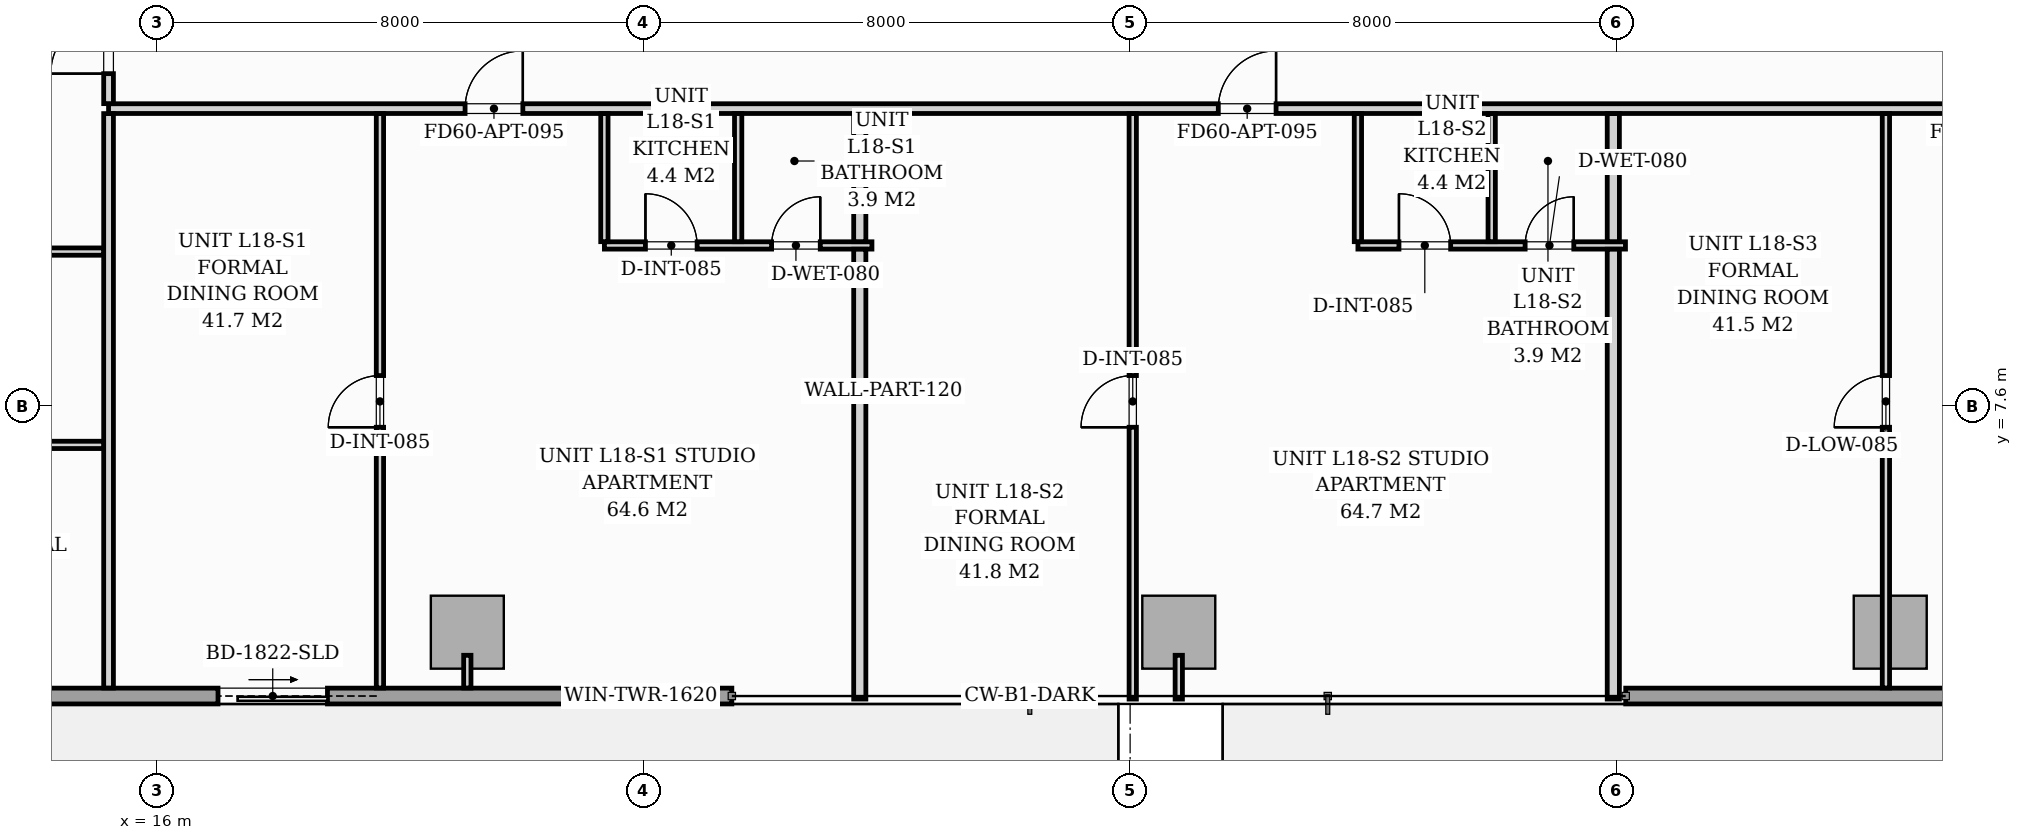
"""IFC4 building model, lengths in metres.
Left out: names, types, materials, properties, quantities, classifications, styles, units other than length and angle.
Written with IfcOpenShell. Run it as: python <this file> out.ifc"""

import sys

from ifc_helpers import new_model, si_unit, direction, frame, frame_2d, origin, origin_2d, place, context, subcontext, project, spatial, rectangle, extrude, source, transform, mapped, element, fill, save


model = new_model("IFC4")
c1 = context("Model", 3, precision=1e-05, world=origin(), true_north=direction((0.0, 1.0)))
c2 = subcontext(c1, "Body", "Model", "MODEL_VIEW")
j1 = project(units=[si_unit("LENGTHUNIT", "METRE"), si_unit("PLANEANGLEUNIT", "RADIAN")], contexts=[c1])
p1 = place(None, origin())
s1 = spatial("IfcSite", under=j1, at=p1, CompositionType="ELEMENT")
p2 = place(p1, origin())
s2 = spatial("IfcBuilding", under=s1, at=p2, CompositionType="ELEMENT")
p3 = place(p2, frame((0.0, 0.0, 64.6)))
s3 = spatial("IfcBuildingStorey", under=s2, at=p3, CompositionType="ELEMENT", Elevation=64.6)
m1 = source(origin(), c2, "Body", "SweptSolid", [
    extrude(rectangle(XDim=1.2, YDim=1.2, at=origin_2d()), origin(), (0.0, 0.0, 1.0), 3.194),
])
for number, where, z_axis, x_axis in (
    (1, (21.1, 3.88, 0.002), (0.0, 0.0, 1.0), (1.0, 0.0, 0.0)),
    (2, (32.8, 3.88, 0.002), (0.0, 0.0, 1.0), (1.0, 0.0, 0.0)),
    (3, (44.5, 3.88, 0.002), (0.0, 0.0, 1.0), (1.0, 0.0, 0.0)),
):
    element("IfcColumn", number, at=place(p3, frame(where, z_axis=z_axis, x_axis=x_axis)), inside=s3, PredefinedType="COLUMN", context=c2, shape_type="MappedRepresentation", body=[
        mapped(m1, transform((0.0, 0.0, 0.0), scale=1.0)),
    ])
p4 = place(p3, frame((57.3, 2.83, 0.0), z_axis=(0.0, 0.0, 1.0), x_axis=(-1.0, 0.0, 0.0)))
e4 = element("IfcWall", 4, at=p4, inside=s3, PredefinedType="STANDARD", context=c2, shape_type="SweptSolid", body=[
    extrude(rectangle(XDim=17.15, YDim=0.26, at=frame_2d((8.575, 0.0))), origin(), (0.0, 0.0, 1.0), 2.9),
])
p5 = place(p4, frame((8.636, 0.0, 0.0)))
e5 = element("IfcOpeningElement", 5, at=p5, cuts=e4, PredefinedType="OPENING", context=c2, shape_type="SweptSolid", body=[
    extrude(rectangle(XDim=1.8, YDim=2.06, at=frame_2d((0.9, 1.03))), frame((0.0, 0.14, 0.0), z_axis=(0.0, -1.0, 0.0), x_axis=(1.0, 0.0, 0.0)), (0.0, 0.0, 1.0), 0.28),
])
p6 = place(p4, frame((2.05, 0.0, 0.65)))
e6 = element("IfcOpeningElement", 6, at=p6, cuts=e4, PredefinedType="OPENING", context=c2, shape_type="SweptSolid", body=[
    extrude(rectangle(XDim=1.6, YDim=1.5, at=frame_2d((0.8, 0.75))), frame((0.0, 0.14, 0.0), z_axis=(0.0, -1.0, 0.0), x_axis=(1.0, 0.0, 0.0)), (0.0, 0.0, 1.0), 0.28),
])
p7 = place(p3, frame((25.45, 2.83, 0.0), z_axis=(0.0, 0.0, 1.0), x_axis=(-1.0, 0.0, 0.0)))
e7 = element("IfcWall", 7, at=p7, inside=s3, PredefinedType="STANDARD", context=c2, shape_type="SweptSolid", body=[
    extrude(rectangle(XDim=17.15, YDim=0.26, at=frame_2d((8.575, 0.0))), origin(), (0.0, 0.0, 1.0), 2.9),
])
p8 = place(p7, frame((6.65, 0.0, 0.0)))
e8 = element("IfcOpeningElement", 8, at=p8, cuts=e7, PredefinedType="OPENING", context=c2, shape_type="SweptSolid", body=[
    extrude(rectangle(XDim=1.8, YDim=2.06, at=frame_2d((0.9, 1.03))), frame((0.0, 0.14, 0.0), z_axis=(0.0, -1.0, 0.0), x_axis=(1.0, 0.0, 0.0)), (0.0, 0.0, 1.0), 0.28),
])
p9 = place(p7, frame((0.7, 0.0, 0.65)))
e9 = element("IfcOpeningElement", 9, at=p9, cuts=e7, PredefinedType="OPENING", context=c2, shape_type="SweptSolid", body=[
    extrude(rectangle(XDim=1.6, YDim=1.5, at=frame_2d((0.8, 0.75))), frame((0.0, 0.14, 0.0), z_axis=(0.0, -1.0, 0.0), x_axis=(1.0, 0.0, 0.0)), (0.0, 0.0, 1.0), 0.28),
])
p10 = place(p3, frame((15.2, 12.49, 0.0), z_axis=(0.0, 0.0, 1.0), x_axis=(1.0, 0.0, 0.0)))
e10 = element("IfcWall", 10, at=p10, inside=s3, PredefinedType="PARTITIONING", context=c2, shape_type="SweptSolid", body=[
    extrude(rectangle(XDim=37.1, YDim=0.16, at=frame_2d((18.55, 0.0))), origin(), (0.0, 0.0, 1.0), 2.9),
])
p11 = place(p10, frame((5.863, 0.0, 0.0)))
e11 = element("IfcOpeningElement", 11, at=p11, cuts=e10, PredefinedType="OPENING", context=c2, shape_type="SweptSolid", body=[
    extrude(rectangle(XDim=0.95, YDim=2.06, at=frame_2d((0.475, 1.03))), frame((0.0, 0.09, 0.0), z_axis=(0.0, -1.0, 0.0), x_axis=(1.0, 0.0, 0.0)), (0.0, 0.0, 1.0), 0.18),
])
p12 = place(p10, frame((18.25, 0.0, 0.0)))
e12 = element("IfcOpeningElement", 12, at=p12, cuts=e10, PredefinedType="OPENING", context=c2, shape_type="SweptSolid", body=[
    extrude(rectangle(XDim=0.95, YDim=2.06, at=frame_2d((0.475, 1.03))), frame((0.0, 0.09, 0.0), z_axis=(0.0, -1.0, 0.0), x_axis=(1.0, 0.0, 0.0)), (0.0, 0.0, 1.0), 0.18),
])
p13 = place(p10, frame((30.63, 0.0, 0.0)))
e13 = element("IfcOpeningElement", 13, at=p13, cuts=e10, PredefinedType="OPENING", context=c2, shape_type="SweptSolid", body=[
    extrude(rectangle(XDim=0.95, YDim=2.06, at=frame_2d((0.475, 1.03))), frame((0.0, 0.09, 0.0), z_axis=(0.0, -1.0, 0.0), x_axis=(1.0, 0.0, 0.0)), (0.0, 0.0, 1.0), 0.18),
])
p14 = place(p3, frame((15.2, 2.962, 0.0), z_axis=(0.0, 0.0, 1.0), x_axis=(0.0, 1.0, 0.0)))
e14 = element("IfcWall", 14, at=p14, inside=s3, PredefinedType="PARTITIONING", context=c2, shape_type="SweptSolid", body=[
    extrude(rectangle(XDim=9.446, YDim=0.16, at=frame_2d((4.723, 0.0))), origin(), (0.0, 0.0, 1.0), 2.9),
])
p15 = place(p3, frame((15.2, 12.572, 0.0), z_axis=(0.0, 0.0, 1.0), x_axis=(0.0, 1.0, 0.0)))
e15 = element("IfcWall", 15, at=p15, inside=s3, PredefinedType="PARTITIONING", context=c2, shape_type="SweptSolid", body=[
    extrude(rectangle(XDim=14.866, YDim=0.16, at=frame_2d((7.433, 0.0))), origin(), (0.0, 0.0, 1.0), 2.9),
])
p16 = place(p15, frame((0.493, 0.0, 0.0)))
e16 = element("IfcOpeningElement", 16, at=p16, cuts=e15, PredefinedType="OPENING", context=c2, shape_type="SweptSolid", body=[
    extrude(rectangle(XDim=0.95, YDim=2.06, at=frame_2d((0.475, 1.03))), frame((0.0, 0.09, 0.0), z_axis=(0.0, -1.0, 0.0), x_axis=(1.0, 0.0, 0.0)), (0.0, 0.0, 1.0), 0.18),
])
p17 = place(p15, frame((6.413, 0.0, 0.0)))
e17 = element("IfcOpeningElement", 17, at=p17, cuts=e15, PredefinedType="OPENING", context=c2, shape_type="SweptSolid", body=[
    extrude(rectangle(XDim=0.95, YDim=2.06, at=frame_2d((0.475, 1.03))), frame((0.0, 0.09, 0.0), z_axis=(0.0, -1.0, 0.0), x_axis=(1.0, 0.0, 0.0)), (0.0, 0.0, 1.0), 0.18),
])
p18 = place(p3, frame((23.354, 10.24, 0.0), z_axis=(0.0, 0.0, 1.0), x_axis=(1.0, 0.0, 0.0)))
e18 = element("IfcWall", 18, at=p18, inside=s3, PredefinedType="PARTITIONING", context=c2, shape_type="SweptSolid", body=[
    extrude(rectangle(XDim=4.4, YDim=0.12, at=frame_2d((2.2, 0.0))), origin(), (0.0, 0.0, 1.0), 2.9),
])
p19 = place(p18, frame((0.675, 0.0, 0.0)))
e19 = element("IfcOpeningElement", 19, at=p19, cuts=e18, PredefinedType="OPENING", context=c2, shape_type="SweptSolid", body=[
    extrude(rectangle(XDim=0.85, YDim=2.05, at=frame_2d((0.425, 1.025))), frame((0.0, 0.07, 0.0), z_axis=(0.0, -1.0, 0.0), x_axis=(1.0, 0.0, 0.0)), (0.0, 0.0, 1.0), 0.14),
])
p20 = place(p18, frame((2.75, 0.0, 0.0)))
e20 = element("IfcOpeningElement", 20, at=p20, cuts=e18, PredefinedType="OPENING", context=c2, shape_type="SweptSolid", body=[
    extrude(rectangle(XDim=0.8, YDim=2.02, at=frame_2d((0.4, 1.01))), frame((0.0, 0.07, 0.0), z_axis=(0.0, -1.0, 0.0), x_axis=(1.0, 0.0, 0.0)), (0.0, 0.0, 1.0), 0.14),
])
for number, where, z_axis, x_axis in (
    (21, (23.354, 10.302, 0.0), (0.0, 0.0, 1.0), (0.0, 1.0, 0.0)),
    (22, (25.554, 10.302, 0.0), (0.0, 0.0, 1.0), (0.0, 1.0, 0.0)),
):
    element("IfcWall", number, at=place(p3, frame(where, z_axis=z_axis, x_axis=x_axis)), inside=s3, PredefinedType="PARTITIONING", context=c2, shape_type="SweptSolid", body=[
        extrude(rectangle(XDim=2.106, YDim=0.12, at=frame_2d((1.053, 0.0))), origin(), (0.0, 0.0, 1.0), 2.9),
    ])
p21 = place(p3, frame((19.663, 2.962, 0.0), z_axis=(0.0, 0.0, 1.0), x_axis=(0.0, 1.0, 0.0)))
e23 = element("IfcWall", 23, at=p21, inside=s3, PredefinedType="PARTITIONING", context=c2, shape_type="SweptSolid", body=[
    extrude(rectangle(XDim=9.446, YDim=0.12, at=frame_2d((4.723, 0.0))), origin(), (0.0, 0.0, 1.0), 2.9),
])
p22 = place(p21, frame((4.288, 0.0, 0.0)))
e24 = element("IfcOpeningElement", 24, at=p22, cuts=e23, PredefinedType="OPENING", context=c2, shape_type="SweptSolid", body=[
    extrude(rectangle(XDim=0.85, YDim=2.05, at=frame_2d((0.425, 1.025))), frame((0.0, 0.07, 0.0), z_axis=(0.0, -1.0, 0.0), x_axis=(1.0, 0.0, 0.0)), (0.0, 0.0, 1.0), 0.14),
])
p23 = place(p3, frame((27.554, 2.78, 0.0), z_axis=(0.0, 0.0, 1.0), x_axis=(0.0, 1.0, 0.0)))
e25 = element("IfcWall", 25, at=p23, inside=s3, PredefinedType="PARTITIONING", context=c2, shape_type="SweptSolid", body=[
    extrude(rectangle(XDim=7.398, YDim=0.2, at=frame_2d((3.699, 0.0))), origin(), (0.0, 0.0, 1.0), 2.9),
])
p24 = place(p3, frame((27.554, 10.302, 0.0), z_axis=(0.0, 0.0, 1.0), x_axis=(0.0, 1.0, 0.0)))
e26 = element("IfcWall", 26, at=p24, inside=s3, PredefinedType="PARTITIONING", context=c2, shape_type="SweptSolid", body=[
    extrude(rectangle(XDim=2.106, YDim=0.2, at=frame_2d((1.053, 0.0))), origin(), (0.0, 0.0, 1.0), 2.9),
])
p25 = place(p3, frame((35.746, 10.24, 0.0), z_axis=(0.0, 0.0, 1.0), x_axis=(1.0, 0.0, 0.0)))
e27 = element("IfcWall", 27, at=p25, inside=s3, PredefinedType="PARTITIONING", context=c2, shape_type="SweptSolid", body=[
    extrude(rectangle(XDim=4.4, YDim=0.12, at=frame_2d((2.2, 0.0))), origin(), (0.0, 0.0, 1.0), 2.9),
])
p26 = place(p25, frame((0.675, 0.0, 0.0)))
e28 = element("IfcOpeningElement", 28, at=p26, cuts=e27, PredefinedType="OPENING", context=c2, shape_type="SweptSolid", body=[
    extrude(rectangle(XDim=0.85, YDim=2.05, at=frame_2d((0.425, 1.025))), frame((0.0, 0.07, 0.0), z_axis=(0.0, -1.0, 0.0), x_axis=(1.0, 0.0, 0.0)), (0.0, 0.0, 1.0), 0.14),
])
p27 = place(p25, frame((2.75, 0.0, 0.0)))
e29 = element("IfcOpeningElement", 29, at=p27, cuts=e27, PredefinedType="OPENING", context=c2, shape_type="SweptSolid", body=[
    extrude(rectangle(XDim=0.8, YDim=2.02, at=frame_2d((0.4, 1.01))), frame((0.0, 0.07, 0.0), z_axis=(0.0, -1.0, 0.0), x_axis=(1.0, 0.0, 0.0)), (0.0, 0.0, 1.0), 0.14),
])
for number, where, z_axis, x_axis in (
    (30, (35.746, 10.302, 0.0), (0.0, 0.0, 1.0), (0.0, 1.0, 0.0)),
    (31, (37.946, 10.302, 0.0), (0.0, 0.0, 1.0), (0.0, 1.0, 0.0)),
):
    element("IfcWall", number, at=place(p3, frame(where, z_axis=z_axis, x_axis=x_axis)), inside=s3, PredefinedType="PARTITIONING", context=c2, shape_type="SweptSolid", body=[
        extrude(rectangle(XDim=2.106, YDim=0.12, at=frame_2d((1.053, 0.0))), origin(), (0.0, 0.0, 1.0), 2.9),
    ])
p28 = place(p3, frame((32.043, 2.78, 0.0), z_axis=(0.0, 0.0, 1.0), x_axis=(0.0, 1.0, 0.0)))
e32 = element("IfcWall", 32, at=p28, inside=s3, PredefinedType="PARTITIONING", context=c2, shape_type="SweptSolid", body=[
    extrude(rectangle(XDim=9.628, YDim=0.12, at=frame_2d((4.814, 0.0))), origin(), (0.0, 0.0, 1.0), 2.9),
])
p29 = place(p28, frame((4.47, 0.0, 0.0)))
e33 = element("IfcOpeningElement", 33, at=p29, cuts=e32, PredefinedType="OPENING", context=c2, shape_type="SweptSolid", body=[
    extrude(rectangle(XDim=0.85, YDim=2.05, at=frame_2d((0.425, 1.025))), frame((0.0, 0.07, 0.0), z_axis=(0.0, -1.0, 0.0), x_axis=(1.0, 0.0, 0.0)), (0.0, 0.0, 1.0), 0.14),
])
p30 = place(p3, frame((39.946, 2.78, 0.0), z_axis=(0.0, 0.0, 1.0), x_axis=(0.0, 1.0, 0.0)))
e34 = element("IfcWall", 34, at=p30, inside=s3, PredefinedType="PARTITIONING", context=c2, shape_type="SweptSolid", body=[
    extrude(rectangle(XDim=7.398, YDim=0.2, at=frame_2d((3.699, 0.0))), origin(), (0.0, 0.0, 1.0), 2.9),
])
p31 = place(p3, frame((39.946, 10.302, 0.0), z_axis=(0.0, 0.0, 1.0), x_axis=(0.0, 1.0, 0.0)))
e35 = element("IfcWall", 35, at=p31, inside=s3, PredefinedType="PARTITIONING", context=c2, shape_type="SweptSolid", body=[
    extrude(rectangle(XDim=2.106, YDim=0.2, at=frame_2d((1.053, 0.0))), origin(), (0.0, 0.0, 1.0), 2.9),
])
p32 = place(p3, frame((44.429, 2.962, 0.0), z_axis=(0.0, 0.0, 1.0), x_axis=(0.0, 1.0, 0.0)))
e36 = element("IfcWall", 36, at=p32, inside=s3, PredefinedType="PARTITIONING", context=c2, shape_type="SweptSolid", body=[
    extrude(rectangle(XDim=9.446, YDim=0.12, at=frame_2d((4.723, 0.0))), origin(), (0.0, 0.0, 1.0), 2.096),
])
p33 = place(p32, frame((4.288, 0.0, 0.0)))
e37 = element("IfcOpeningElement", 37, at=p33, cuts=e36, PredefinedType="OPENING", context=c2, shape_type="SweptSolid", body=[
    extrude(rectangle(XDim=0.85, YDim=2.01, at=frame_2d((0.425, 1.005))), frame((0.0, 0.07, 0.0), z_axis=(0.0, -1.0, 0.0), x_axis=(1.0, 0.0, 0.0)), (0.0, 0.0, 1.0), 0.14),
])
p34 = place(p3, frame((5.88, 6.96, 0.0), z_axis=(0.0, 0.0, 1.0), x_axis=(1.0, 0.0, 0.0)))
e38 = element("IfcWall", 38, at=p34, inside=s3, PredefinedType="PARTITIONING", context=c2, shape_type="SweptSolid", body=[
    extrude(rectangle(XDim=9.238, YDim=0.12, at=frame_2d((4.619, 0.0))), origin(), (0.0, 0.0, 1.0), 2.9),
])
p35 = place(p34, frame((4.185, 0.0, 0.0)))
e39 = element("IfcOpeningElement", 39, at=p35, cuts=e38, PredefinedType="OPENING", context=c2, shape_type="SweptSolid", body=[
    extrude(rectangle(XDim=0.8, YDim=2.0, at=frame_2d((0.4, 1.0))), frame((0.0, 0.07, 0.0), z_axis=(0.0, -1.0, 0.0), x_axis=(1.0, 0.0, 0.0)), (0.0, 0.0, 1.0), 0.14),
])
p36 = place(p3, frame((5.88, 10.139, 0.0), z_axis=(0.0, 0.0, 1.0), x_axis=(1.0, 0.0, 0.0)))
e40 = element("IfcWall", 40, at=p36, inside=s3, PredefinedType="PARTITIONING", context=c2, shape_type="SweptSolid", body=[
    extrude(rectangle(XDim=9.238, YDim=0.12, at=frame_2d((4.619, 0.0))), origin(), (0.0, 0.0, 1.0), 2.9),
])
p37 = place(p36, frame((4.185, 0.0, 0.0)))
e41 = element("IfcOpeningElement", 41, at=p37, cuts=e40, PredefinedType="OPENING", context=c2, shape_type="SweptSolid", body=[
    extrude(rectangle(XDim=0.85, YDim=2.05, at=frame_2d((0.425, 1.025))), frame((0.0, 0.07, 0.0), z_axis=(0.0, -1.0, 0.0), x_axis=(1.0, 0.0, 0.0)), (0.0, 0.0, 1.0), 0.14),
])
p38 = place(p3, frame((21.1, 3.5, 0.0), z_axis=(0.0, 0.0, 1.0), x_axis=(0.0, -1.0, 0.0)))
e42 = element("IfcWall", 42, at=p38, inside=s3, PredefinedType="PARTITIONING", context=c2, shape_type="SweptSolid", body=[
    extrude(rectangle(XDim=0.538, YDim=0.12, at=frame_2d((0.269, 0.0))), origin(), (0.0, 0.0, 1.0), 2.9),
])
p39 = place(p3, frame((32.8, 3.5, 0.0), z_axis=(0.0, 0.0, 1.0), x_axis=(0.0, -1.0, 0.0)))
e43 = element("IfcWall", 43, at=p39, inside=s3, PredefinedType="PARTITIONING", context=c2, shape_type="SweptSolid", body=[
    extrude(rectangle(XDim=0.72, YDim=0.12, at=frame_2d((0.36, 0.0))), origin(), (0.0, 0.0, 1.0), 2.9),
])
m2 = source(origin(), c2, "Body", "SweptSolid", [
    extrude(rectangle(XDim=1.8, YDim=2.06, at=frame_2d((0.9, 1.03))), frame((0.0, 0.025, 0.0), z_axis=(0.0, -1.0, 0.0), x_axis=(1.0, 0.0, 0.0)), (0.0, 0.0, 1.0), 0.05),
])
p40 = place(p8, origin())
e44 = element("IfcDoor", 44, at=p40, inside=s3, OperationType="SLIDING_TO_LEFT", PredefinedType="DOOR", context=c2, shape_type="MappedRepresentation", body=[
    mapped(m2, transform((0.0, 0.0, 0.0), scale=1.0)),
])
fill(e8, e44)
m3 = source(origin(), c2, "Body", "SweptSolid", [
    extrude(rectangle(XDim=1.6, YDim=1.5, at=frame_2d((0.8, 0.75))), frame((0.0, 0.03, 0.0), z_axis=(0.0, -1.0, 0.0), x_axis=(1.0, 0.0, 0.0)), (0.0, 0.0, 1.0), 0.06),
])
p41 = place(p9, origin())
e45 = element("IfcWindow", 45, at=p41, inside=s3, PartitioningType="SINGLE_PANEL", PredefinedType="WINDOW", context=c2, shape_type="MappedRepresentation", body=[
    mapped(m3, transform((0.0, 0.0, 0.0), scale=1.0)),
])
fill(e9, e45)
m4 = source(origin(), c2, "Body", "SweptSolid", [
    extrude(rectangle(XDim=0.85, YDim=2.05, at=frame_2d((0.425, 1.025))), frame((0.0, 0.025, 0.0), z_axis=(0.0, -1.0, 0.0), x_axis=(1.0, 0.0, 0.0)), (0.0, 0.0, 1.0), 0.05),
])
p42 = place(p22, origin())
e46 = element("IfcDoor", 46, at=p42, inside=s3, OperationType="SINGLE_SWING_LEFT", PredefinedType="DOOR", context=c2, shape_type="MappedRepresentation", body=[
    mapped(m4, transform((0.0, 0.0, 0.0), scale=1.0)),
])
fill(e24, e46)
m5 = source(origin(), c2, "Body", "SweptSolid", [
    extrude(rectangle(XDim=0.95, YDim=2.06, at=frame_2d((0.475, 1.03))), frame((0.0, 0.025, 0.0), z_axis=(0.0, -1.0, 0.0), x_axis=(1.0, 0.0, 0.0)), (0.0, 0.0, 1.0), 0.05),
])
p43 = place(p11, origin())
e47 = element("IfcDoor", 47, at=p43, inside=s3, OperationType="SINGLE_SWING_RIGHT", PredefinedType="DOOR", context=c2, shape_type="MappedRepresentation", body=[
    mapped(m5, transform((0.0, 0.0, 0.0), scale=1.0)),
])
fill(e11, e47)
p44 = place(p19, origin())
e48 = element("IfcDoor", 48, at=p44, inside=s3, OperationType="SINGLE_SWING_LEFT", PredefinedType="DOOR", context=c2, shape_type="MappedRepresentation", body=[
    mapped(m4, transform((0.0, 0.0, 0.0), scale=1.0)),
])
fill(e19, e48)
m6 = source(origin(), c2, "Body", "SweptSolid", [
    extrude(rectangle(XDim=0.8, YDim=2.02, at=frame_2d((0.4, 1.01))), frame((0.0, 0.025, 0.0), z_axis=(0.0, -1.0, 0.0), x_axis=(1.0, 0.0, 0.0)), (0.0, 0.0, 1.0), 0.05),
])
p45 = place(p20, origin())
e49 = element("IfcDoor", 49, at=p45, inside=s3, OperationType="SINGLE_SWING_RIGHT", PredefinedType="DOOR", context=c2, shape_type="MappedRepresentation", body=[
    mapped(m6, transform((0.0, 0.0, 0.0), scale=1.0)),
])
fill(e20, e49)
p46 = place(p29, origin())
e50 = element("IfcDoor", 50, at=p46, inside=s3, OperationType="SINGLE_SWING_LEFT", PredefinedType="DOOR", context=c2, shape_type="MappedRepresentation", body=[
    mapped(m4, transform((0.0, 0.0, 0.0), scale=1.0)),
])
fill(e33, e50)
p47 = place(p12, origin())
e51 = element("IfcDoor", 51, at=p47, inside=s3, OperationType="SINGLE_SWING_RIGHT", PredefinedType="DOOR", context=c2, shape_type="MappedRepresentation", body=[
    mapped(m5, transform((0.0, 0.0, 0.0), scale=1.0)),
])
fill(e12, e51)
p48 = place(p26, origin())
e52 = element("IfcDoor", 52, at=p48, inside=s3, OperationType="SINGLE_SWING_LEFT", PredefinedType="DOOR", context=c2, shape_type="MappedRepresentation", body=[
    mapped(m4, transform((0.0, 0.0, 0.0), scale=1.0)),
])
fill(e28, e52)
p49 = place(p27, origin())
e53 = element("IfcDoor", 53, at=p49, inside=s3, OperationType="SINGLE_SWING_RIGHT", PredefinedType="DOOR", context=c2, shape_type="MappedRepresentation", body=[
    mapped(m6, transform((0.0, 0.0, 0.0), scale=1.0)),
])
fill(e29, e53)
m7 = source(origin(), c2, "Body", "SweptSolid", [
    extrude(rectangle(XDim=0.85, YDim=2.01, at=frame_2d((0.425, 1.005))), frame((0.0, 0.025, 0.0), z_axis=(0.0, -1.0, 0.0), x_axis=(1.0, 0.0, 0.0)), (0.0, 0.0, 1.0), 0.05),
])
p50 = place(p33, origin())
e54 = element("IfcDoor", 54, at=p50, inside=s3, OperationType="SINGLE_SWING_LEFT", PredefinedType="DOOR", context=c2, shape_type="MappedRepresentation", body=[
    mapped(m7, transform((0.0, 0.0, 0.0), scale=1.0)),
])
fill(e37, e54)
p51 = place(p16, origin())
e55 = element("IfcDoor", 55, at=p51, inside=s3, OperationType="SINGLE_SWING_LEFT", PredefinedType="DOOR", context=c2, shape_type="MappedRepresentation", body=[
    mapped(m5, transform((0.0, 0.0, 0.0), scale=1.0)),
])
fill(e16, e55)
save(model, sys.argv[1])
